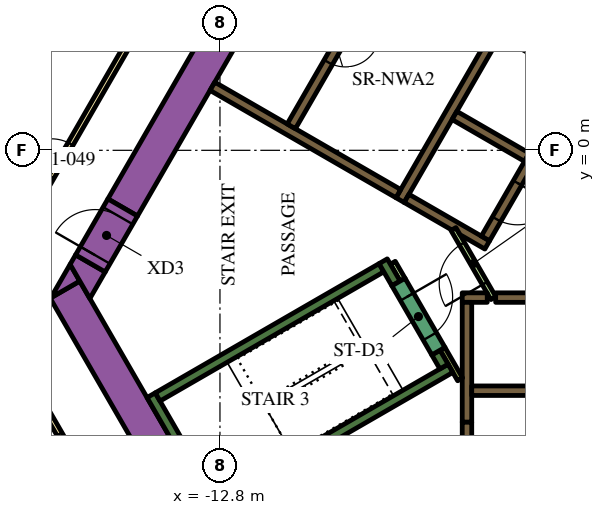
"""IFC4 building model, lengths in metres.
Left out: names, types, materials, properties, quantities, classifications, styles, units other than length and angle.
Written with IfcOpenShell. Run it as: python <this file> out.ifc"""

import sys

from ifc_helpers import new_model, si_unit, direction, frame, frame_2d, origin, place, context, subcontext, project, spatial, polyline, rectangle, outline, extrude, element, fill, save


model = new_model("IFC4")
c1 = context("Model", 3, precision=1e-05, world=origin(), true_north=direction((0.0, 1.0)))
c2 = subcontext(c1, "Body", "Model", "MODEL_VIEW")
j1 = project(units=[si_unit("LENGTHUNIT", "METRE"), si_unit("PLANEANGLEUNIT", "RADIAN")], contexts=[c1])
p1 = place(None, origin())
s1 = spatial("IfcSite", under=j1, at=p1, CompositionType="ELEMENT")
p2 = place(p1, origin())
s2 = spatial("IfcBuilding", under=s1, at=p2, CompositionType="ELEMENT")
p3 = place(p2, frame((0.0, 0.0, 35.4)))
s3 = spatial("IfcBuildingStorey", under=s2, at=p3, CompositionType="ELEMENT", Elevation=35.4)
p4 = place(p3, frame((-15.36, -1.503, 0.0), z_axis=(0.0, 0.0, 1.0), x_axis=(0.50000389221, 0.866023156604, 0.0)))
e1 = element("IfcWall", 1, at=p4, inside=s3, PredefinedType="SOLIDWALL", context=c2, shape_type="SweptSolid", body=[
    extrude(rectangle(XDim=21.0, YDim=0.9, at=frame_2d((10.5, 0.0))), origin(), (0.0, 0.0, 1.0), 3.9),
])
p5 = place(p3, frame((-12.134, -11.883, 0.0), z_axis=(0.0, 0.0, 1.0), x_axis=(-0.500005339912, 0.866022320763, 0.0)))
e2 = element("IfcWall", 2, at=p5, inside=s3, PredefinedType="SOLIDWALL", context=c2, shape_type="SweptSolid", body=[
    extrude(rectangle(XDim=9.488, YDim=0.9, at=frame_2d((4.744, 0.0))), origin(), (0.0, 0.0, 1.0), 3.9),
])
p6 = place(p3, origin())
e3 = element("IfcWall", 3, at=p6, inside=s3, PredefinedType="SOLIDWALL", context=c2, shape_type="SweptSolid", body=[
    extrude(outline(polyline([(-16.489, -3.44), (-17.251, -3.88), (-16.743, -3.0), (-16.489, -3.44)])), origin(), (0.0, 0.0, 1.0), 3.9),
])
e4 = element("IfcWall", 4, at=p6, inside=s3, PredefinedType="SOLIDWALL", context=c2, shape_type="SweptSolid", body=[
    extrude(outline(polyline([(-15.82, -3.201), (-16.223, -3.9), (-16.743, -3.0), (-16.599, -2.751), (-15.82, -3.201)])), origin(), (0.0, 0.0, 1.0), 3.9),
])
p7 = place(p3, frame((-12.885, -9.431, 0.0), z_axis=(0.0, 0.0, 1.0), x_axis=(-0.500020560727, 0.866013532718, 0.0)))
e5 = element("IfcWall", 5, at=p7, inside=s3, PredefinedType="SOLIDWALL", context=c2, shape_type="SweptSolid", body=[
    extrude(rectangle(XDim=3.45, YDim=0.25, at=frame_2d((1.725, 0.0))), origin(), (0.0, 0.0, 1.0), 3.9),
])
p8 = place(p3, frame((-14.44, -6.49, 0.0), z_axis=(0.0, 0.0, 1.0), x_axis=(0.866022966069, 0.500004222222, 0.0)))
e6 = element("IfcWall", 6, at=p8, inside=s3, PredefinedType="SOLIDWALL", context=c2, shape_type="SweptSolid", body=[
    extrude(rectangle(XDim=6.8, YDim=0.25, at=frame_2d((3.4, 0.0))), origin(), (0.0, 0.0, 1.0), 3.9),
])
p9 = place(p3, frame((-8.168, -3.503, 0.0), z_axis=(0.0, 0.0, 1.0), x_axis=(-0.499952099219, 0.866053057547, 0.0)))
e7 = element("IfcWall", 7, at=p9, inside=s3, PredefinedType="SOLIDWALL", context=c2, shape_type="SweptSolid", body=[
    extrude(rectangle(XDim=0.675, YDim=0.25, at=frame_2d((0.337, 0.0))), origin(), (0.0, 0.0, 1.0), 3.9),
])
p10 = place(p3, frame((-12.84, -9.261, 0.0), z_axis=(0.0, 0.0, 1.0), x_axis=(0.866016039709, 0.500016218704, 0.0)))
e8 = element("IfcWall", 8, at=p10, inside=s3, PredefinedType="SOLIDWALL", context=c2, shape_type="SweptSolid", body=[
    extrude(rectangle(XDim=7.05, YDim=0.25, at=frame_2d((3.525, 0.0))), origin(), (0.0, 0.0, 1.0), 3.9),
])
p11 = place(p3, frame((-6.905, -5.69, 0.0), z_axis=(0.0, 0.0, 1.0), x_axis=(-0.500402024738, 0.865793170242, 0.0)))
e9 = element("IfcWall", 9, at=p11, inside=s3, PredefinedType="SOLIDWALL", context=c2, shape_type="SweptSolid", body=[
    extrude(rectangle(XDim=0.425, YDim=0.25, at=frame_2d((0.212, 0.0))), origin(), (0.0, 0.0, 1.0), 3.9),
])
p12 = place(p3, frame((-5.545, -3.875, 0.0), z_axis=(0.0, 0.0, 1.0), x_axis=(1.0, 0.0, 0.0)))
e10 = element("IfcWall", 10, at=p12, inside=s3, PredefinedType="SOLIDWALL", context=c2, shape_type="SweptSolid", body=[
    extrude(rectangle(XDim=11.97, YDim=0.25, at=frame_2d((5.985, 0.0))), origin(), (0.0, 0.0, 1.0), 3.9),
])
p13 = place(p3, frame((-6.425, -3.875, 0.0), z_axis=(0.0, 0.0, 1.0), x_axis=(1.0, 0.0, 0.0)))
e11 = element("IfcWall", 11, at=p13, inside=s3, PredefinedType="SOLIDWALL", context=c2, shape_type="SweptSolid", body=[
    extrude(rectangle(XDim=0.658, YDim=0.25, at=frame_2d((0.329, 0.0))), origin(), (0.0, 0.0, 1.0), 3.9),
])
p14 = place(p3, frame((-6.3, -4.0, 0.0), z_axis=(0.0, 0.0, 1.0), x_axis=(0.0, -1.0, 0.0)))
e12 = element("IfcWall", 12, at=p14, inside=s3, PredefinedType="SOLIDWALL", context=c2, shape_type="SweptSolid", body=[
    extrude(rectangle(XDim=3.154, YDim=0.25, at=frame_2d((1.577, 0.0))), origin(), (0.0, 0.0, 1.0), 3.9),
])
p15 = place(p3, frame((-8.06, -1.311, 0.0), z_axis=(0.0, 0.0, 1.0), x_axis=(0.50000273126, 0.866023826885, 0.0)))
e13 = element("IfcWall", 13, at=p15, inside=s3, PredefinedType="SOLIDWALL", context=c2, shape_type="SweptSolid", body=[
    extrude(rectangle(XDim=10.33, YDim=0.25, at=frame_2d((5.165, 0.0))), origin(), (0.0, 0.0, 1.0), 3.9),
])
for number, where, z_axis, x_axis in (
    (14, (-5.369, 3.1, 0.0), (0.0, 0.0, 1.0), (0.866, -0.5, 0.0)),
    (15, (-4.724, -0.182, 0.0), (0.0, 0.0, 1.0), (-0.866, 0.5, 0.0)),
):
    element("IfcWall", number, at=place(p3, frame(where, z_axis=z_axis, x_axis=x_axis)), inside=s3, PredefinedType="SOLIDWALL", context=c2, shape_type="SweptSolid", body=[
        extrude(rectangle(XDim=2.2, YDim=0.25, at=frame_2d((1.1, 0.0))), origin(), (0.0, 0.0, 1.0), 3.9),
    ])
e16 = element("IfcWall", 16, at=p6, inside=s3, PredefinedType="SOLIDWALL", context=c2, shape_type="SweptSolid", body=[
    extrude(outline(polyline([(-5.922, -2.257), (-5.922, -2.257), (-5.705, -2.382), (-5.83, -2.598), (-6.483, -2.221), (-6.591, -2.033), (-6.591, -2.033), (-6.7, -2.096), (-7.952, -1.373), (-7.827, -1.156), (-5.922, -2.257)])), origin(), (0.0, 0.0, 1.0), 3.9),
])
p16 = place(p3, frame((-8.106, -1.14, 0.0), z_axis=(0.0, 0.0, 1.0), x_axis=(-0.866000643155, 0.500042884217, 0.0)))
e17 = element("IfcWall", 17, at=p16, inside=s3, PredefinedType="SOLIDWALL", context=c2, shape_type="SweptSolid", body=[
    extrude(rectangle(XDim=5.65, YDim=0.25, at=frame_2d((2.825, 0.0))), origin(), (0.0, 0.0, 1.0), 3.9),
])
p17 = place(p3, frame((-6.48, -6.027, 0.0), z_axis=(0.0, 0.0, 1.0), x_axis=(-0.499927229454, 0.866067413802, 0.0)))
e18 = element("IfcWall", 18, at=p17, inside=s3, PredefinedType="PARTITIONING", context=c2, shape_type="SweptSolid", body=[
    extrude(rectangle(XDim=0.929, YDim=0.15, at=frame_2d((0.464, 0.0))), origin(), (0.0, 0.0, 1.0), 3.9),
])
p18 = place(p3, frame((-8.252, -2.958, 0.0), z_axis=(0.0, 0.0, 1.0), x_axis=(0.500174715838, -0.865924508047, 0.0)))
e19 = element("IfcWall", 19, at=p18, inside=s3, PredefinedType="PARTITIONING", context=c2, shape_type="SweptSolid", body=[
    extrude(rectangle(XDim=0.514, YDim=0.15, at=frame_2d((0.257, 0.0))), origin(), (0.0, 0.0, 1.0), 2.75),
])
p19 = place(p3, frame((-6.175, -6.325, 0.0), z_axis=(0.0, 0.0, 1.0), x_axis=(1.0, 0.0, 0.0)))
e20 = element("IfcWall", 20, at=p19, inside=s3, PredefinedType="SOLIDWALL", context=c2, shape_type="SweptSolid", body=[
    extrude(rectangle(XDim=12.35, YDim=0.25, at=frame_2d((6.175, 0.0))), origin(), (0.0, 0.0, 1.0), 3.9),
])
p20 = place(p19, frame((3.205, 0.0, 0.0)))
e21 = element("IfcOpeningElement", 21, at=p20, cuts=e20, PredefinedType="OPENING", context=c2, shape_type="SweptSolid", body=[
    extrude(rectangle(XDim=0.9, YDim=2.1, at=frame_2d((0.45, 1.05))), frame((0.0, 0.135, 0.0), z_axis=(0.0, -1.0, 0.0), x_axis=(1.0, 0.0, 0.0)), (0.0, 0.0, 1.0), 0.27),
])
p21 = place(p19, frame((8.145, 0.0, 0.0)))
e22 = element("IfcOpeningElement", 22, at=p21, cuts=e20, PredefinedType="OPENING", context=c2, shape_type="SweptSolid", body=[
    extrude(rectangle(XDim=1.1, YDim=2.1, at=frame_2d((0.55, 1.05))), frame((0.0, 0.135, 0.0), z_axis=(0.0, -1.0, 0.0), x_axis=(1.0, 0.0, 0.0)), (0.0, 0.0, 1.0), 0.27),
])
p22 = place(p19, frame((10.665, 0.0, 0.0)))
e23 = element("IfcOpeningElement", 23, at=p22, cuts=e20, PredefinedType="OPENING", context=c2, shape_type="SweptSolid", body=[
    extrude(rectangle(XDim=1.1, YDim=2.1, at=frame_2d((0.55, 1.05))), frame((0.0, 0.135, 0.0), z_axis=(0.0, -1.0, 0.0), x_axis=(1.0, 0.0, 0.0)), (0.0, 0.0, 1.0), 0.27),
])
p23 = place(p3, frame((-6.008, 9.144, 0.0), z_axis=(0.0, 0.0, 1.0), x_axis=(-0.500006956611, -0.866021387346, 0.0)))
e24 = element("IfcWall", 24, at=p23, inside=s3, PredefinedType="SOLIDWALL", context=c2, shape_type="SweptSolid", body=[
    extrude(rectangle(XDim=9.83, YDim=0.25, at=frame_2d((4.915, 0.0))), origin(), (0.0, 0.0, 1.0), 3.9),
])
p24 = place(p23, frame((6.985, 0.0, 0.0)))
e25 = element("IfcOpeningElement", 25, at=p24, cuts=e24, PredefinedType="OPENING", context=c2, shape_type="SweptSolid", body=[
    extrude(rectangle(XDim=0.9, YDim=2.1, at=frame_2d((0.45, 1.05))), frame((0.0, 0.135, 0.0), z_axis=(0.0, -1.0, 0.0), x_axis=(1.0, 0.0, 0.0)), (0.0, 0.0, 1.0), 0.27),
])
p25 = place(p3, frame((-0.898, 6.194, 0.0), z_axis=(0.0, 0.0, 1.0), x_axis=(-0.499996202215, -0.866027596426, 0.0)))
e26 = element("IfcWall", 26, at=p25, inside=s3, PredefinedType="SOLIDWALL", context=c2, shape_type="SweptSolid", body=[
    extrude(rectangle(XDim=9.83, YDim=0.25, at=frame_2d((4.915, 0.0))), origin(), (0.0, 0.0, 1.0), 3.9),
])
p26 = place(p25, frame((0.585, 0.0, 0.0)))
e27 = element("IfcOpeningElement", 27, at=p26, cuts=e26, PredefinedType="OPENING", context=c2, shape_type="SweptSolid", body=[
    extrude(rectangle(XDim=1.1, YDim=2.1, at=frame_2d((0.55, 1.05))), frame((0.0, 0.135, 0.0), z_axis=(0.0, -1.0, 0.0), x_axis=(1.0, 0.0, 0.0)), (0.0, 0.0, 1.0), 0.27),
])
p27 = place(p25, frame((3.105, 0.0, 0.0)))
e28 = element("IfcOpeningElement", 28, at=p27, cuts=e26, PredefinedType="OPENING", context=c2, shape_type="SweptSolid", body=[
    extrude(rectangle(XDim=1.1, YDim=2.1, at=frame_2d((0.55, 1.05))), frame((0.0, 0.135, 0.0), z_axis=(0.0, -1.0, 0.0), x_axis=(1.0, 0.0, 0.0)), (0.0, 0.0, 1.0), 0.27),
])
p28 = place(p25, frame((5.625, 0.0, 0.0)))
e29 = element("IfcOpeningElement", 29, at=p28, cuts=e26, PredefinedType="OPENING", context=c2, shape_type="SweptSolid", body=[
    extrude(rectangle(XDim=1.1, YDim=2.1, at=frame_2d((0.55, 1.05))), frame((0.0, 0.135, 0.0), z_axis=(0.0, -1.0, 0.0), x_axis=(1.0, 0.0, 0.0)), (0.0, 0.0, 1.0), 0.27),
])
p29 = place(p25, frame((8.145, 0.0, 0.0)))
e30 = element("IfcOpeningElement", 30, at=p29, cuts=e26, PredefinedType="OPENING", context=c2, shape_type="SweptSolid", body=[
    extrude(rectangle(XDim=1.1, YDim=2.1, at=frame_2d((0.55, 1.05))), frame((0.0, 0.135, 0.0), z_axis=(0.0, -1.0, 0.0), x_axis=(1.0, 0.0, 0.0)), (0.0, 0.0, 1.0), 0.27),
])
p30 = place(p3, frame((-8.103, -3.466, 0.0), z_axis=(0.0, 0.0, 1.0), x_axis=(0.500078061341, -0.865980330357, 0.0)))
e31 = element("IfcWall", 31, at=p30, inside=s3, PredefinedType="SOLIDWALL", context=c2, shape_type="SweptSolid", body=[
    extrude(rectangle(XDim=2.1, YDim=0.4, at=frame_2d((1.05, 0.0))), origin(), (0.0, 0.0, 1.0), 3.9),
])
p31 = place(p30, frame((0.45, 0.0, 0.0)))
e32 = element("IfcOpeningElement", 32, at=p31, cuts=e31, PredefinedType="OPENING", context=c2, shape_type="SweptSolid", body=[
    extrude(rectangle(XDim=1.2, YDim=2.1, at=frame_2d((0.6, 1.05))), frame((0.0, 0.21, 0.0), z_axis=(0.0, -1.0, 0.0), x_axis=(1.0, 0.0, 0.0)), (0.0, 0.0, 1.0), 0.42),
])
p32 = place(p3, frame((-6.3, -7.154, 0.0), z_axis=(0.0, 0.0, 1.0), x_axis=(0.0, -1.0, 0.0)))
e33 = element("IfcWall", 33, at=p32, inside=s3, PredefinedType="SOLIDWALL", context=c2, shape_type="SweptSolid", body=[
    extrude(rectangle(XDim=1.8, YDim=0.25, at=frame_2d((0.9, 0.0))), origin(), (0.0, 0.0, 1.0), 3.9),
])
p33 = place(p32, frame((0.45, 0.0, 0.0)))
e34 = element("IfcOpeningElement", 34, at=p33, cuts=e33, PredefinedType="OPENING", context=c2, shape_type="SweptSolid", body=[
    extrude(rectangle(XDim=0.9, YDim=2.1, at=frame_2d((0.45, 1.05))), frame((0.0, 0.135, 0.0), z_axis=(0.0, -1.0, 0.0), x_axis=(1.0, 0.0, 0.0)), (0.0, 0.0, 1.0), 0.27),
])
p34 = place(p3, frame((-5.606, -3.89, 0.0), z_axis=(0.0, 0.0, 1.0), x_axis=(-0.500027713859, 0.866009402589, 0.0)))
e35 = element("IfcWall", 35, at=p34, inside=s3, PredefinedType="PARTITIONING", context=c2, shape_type="SweptSolid", body=[
    extrude(rectangle(XDim=2.1, YDim=0.15, at=frame_2d((1.05, 0.0))), origin(), (0.0, 0.0, 1.0), 2.75),
])
p35 = place(p34, frame((0.45, 0.0, 0.0)))
e36 = element("IfcOpeningElement", 36, at=p35, cuts=e35, PredefinedType="OPENING", context=c2, shape_type="SweptSolid", body=[
    extrude(rectangle(XDim=1.2, YDim=2.1, at=frame_2d((0.6, 1.05))), frame((0.0, 0.085, 0.0), z_axis=(0.0, -1.0, 0.0), x_axis=(1.0, 0.0, 0.0)), (0.0, 0.0, 1.0), 0.17),
])
p36 = place(p3, frame((-16.209, -2.976, 0.0), z_axis=(0.0, 0.0, 1.0), x_axis=(0.499954529098, 0.86605165483, 0.0)))
e37 = element("IfcWall", 37, at=p36, inside=s3, PredefinedType="SOLIDWALL", context=c2, shape_type="SweptSolid", body=[
    extrude(rectangle(XDim=1.7, YDim=0.9, at=frame_2d((0.85, 0.0))), origin(), (0.0, 0.0, 1.0), 3.9),
])
p37 = place(p36, frame((0.25, 0.0, 0.0)))
e38 = element("IfcOpeningElement", 38, at=p37, cuts=e37, PredefinedType="OPENING", context=c2, shape_type="SweptSolid", body=[
    extrude(rectangle(XDim=1.2, YDim=2.1, at=frame_2d((0.6, 1.05))), frame((0.0, 0.46, 0.0), z_axis=(0.0, -1.0, 0.0), x_axis=(1.0, 0.0, 0.0)), (0.0, 0.0, 1.0), 0.92),
])
p38 = place(p3, frame((-19.081, -3.9, 0.0), z_axis=(0.0, 0.0, 1.0), x_axis=(0.499998313975, 0.866026377209, 0.0)))
e39 = element("IfcWall", 39, at=p38, inside=s3, PredefinedType="PARTITIONING", context=c2, shape_type="SweptSolid", body=[
    extrude(rectangle(XDim=25.766, YDim=0.15, at=frame_2d((12.883, 0.0))), origin(), (0.0, 0.0, 1.0), 2.75),
])
p39 = place(p38, frame((24.586, 0.0, 0.0)))
e40 = element("IfcOpeningElement", 40, at=p39, cuts=e39, PredefinedType="OPENING", context=c2, shape_type="SweptSolid", body=[
    extrude(rectangle(XDim=1.0, YDim=2.1, at=frame_2d((0.5, 1.05))), frame((0.0, 0.085, 0.0), z_axis=(0.0, -1.0, 0.0), x_axis=(1.0, 0.0, 0.0)), (0.0, 0.0, 1.0), 0.17),
])
p40 = place(p38, frame((16.196, 0.0, 0.0)))
e41 = element("IfcOpeningElement", 41, at=p40, cuts=e39, PredefinedType="OPENING", context=c2, shape_type="SweptSolid", body=[
    extrude(rectangle(XDim=1.0, YDim=2.1, at=frame_2d((0.5, 1.05))), frame((0.0, 0.085, 0.0), z_axis=(0.0, -1.0, 0.0), x_axis=(1.0, 0.0, 0.0)), (0.0, 0.0, 1.0), 0.17),
])
p41 = place(p38, frame((14.789, 0.0, 0.0)))
e42 = element("IfcOpeningElement", 42, at=p41, cuts=e39, PredefinedType="OPENING", context=c2, shape_type="SweptSolid", body=[
    extrude(rectangle(XDim=1.1, YDim=2.1, at=frame_2d((0.55, 1.05))), frame((0.0, 0.085, 0.0), z_axis=(0.0, -1.0, 0.0), x_axis=(1.0, 0.0, 0.0)), (0.0, 0.0, 1.0), 0.17),
])
p42 = place(p38, frame((3.698, 0.0, 0.0)))
e43 = element("IfcOpeningElement", 43, at=p42, cuts=e39, PredefinedType="OPENING", context=c2, shape_type="SweptSolid", body=[
    extrude(rectangle(XDim=1.0, YDim=2.1, at=frame_2d((0.5, 1.05))), frame((0.0, 0.085, 0.0), z_axis=(0.0, -1.0, 0.0), x_axis=(1.0, 0.0, 0.0)), (0.0, 0.0, 1.0), 0.17),
])
p43 = place(p38, frame((1.531, 0.0, 0.0)))
e44 = element("IfcOpeningElement", 44, at=p43, cuts=e39, PredefinedType="OPENING", context=c2, shape_type="SweptSolid", body=[
    extrude(rectangle(XDim=0.9, YDim=2.1, at=frame_2d((0.45, 1.05))), frame((0.0, 0.085, 0.0), z_axis=(0.0, -1.0, 0.0), x_axis=(1.0, 0.0, 0.0)), (0.0, 0.0, 1.0), 0.17),
])
p44 = place(p3, frame((-16.412, -8.523, 0.0), z_axis=(0.0, 0.0, 1.0), x_axis=(-0.500001929737, 0.866024289647, 0.0)))
e45 = element("IfcWall", 45, at=p44, inside=s3, PredefinedType="PARTITIONING", context=c2, shape_type="SweptSolid", body=[
    extrude(rectangle(XDim=5.268, YDim=0.15, at=frame_2d((2.634, 0.0))), origin(), (0.0, 0.0, 1.0), 2.75),
])
p45 = place(p44, frame((0.226, 0.0, 0.0)))
e46 = element("IfcOpeningElement", 46, at=p45, cuts=e45, PredefinedType="OPENING", context=c2, shape_type="SweptSolid", body=[
    extrude(rectangle(XDim=1.0, YDim=2.1, at=frame_2d((0.5, 1.05))), frame((0.0, 0.085, 0.0), z_axis=(0.0, -1.0, 0.0), x_axis=(1.0, 0.0, 0.0)), (0.0, 0.0, 1.0), 0.17),
])
p46 = place(p24, origin())
e47 = element("IfcDoor", 47, at=p46, inside=s3, OperationType="SINGLE_SWING_LEFT", PredefinedType="DOOR", context=c2, shape_type="SweptSolid", body=[
    extrude(rectangle(XDim=0.9, YDim=2.1, at=frame_2d((0.45, 1.05))), frame((0.0, 0.025, 0.0), z_axis=(0.0, -1.0, 0.0), x_axis=(1.0, 0.0, 0.0)), (0.0, 0.0, 1.0), 0.05),
])
fill(e25, e47)
p47 = place(p29, origin())
e48 = element("IfcDoor", 48, at=p47, inside=s3, OperationType="DOUBLE_DOOR_SLIDING", PredefinedType="DOOR", context=c2, shape_type="SweptSolid", body=[
    extrude(rectangle(XDim=1.1, YDim=2.1, at=frame_2d((0.55, 1.05))), frame((0.0, 0.025, 0.0), z_axis=(0.0, -1.0, 0.0), x_axis=(1.0, 0.0, 0.0)), (0.0, 0.0, 1.0), 0.05),
])
fill(e30, e48)
p48 = place(p31, origin())
e49 = element("IfcDoor", 49, at=p48, inside=s3, OperationType="SINGLE_SWING_LEFT", PredefinedType="DOOR", context=c2, shape_type="SweptSolid", body=[
    extrude(rectangle(XDim=1.2, YDim=2.1, at=frame_2d((0.6, 1.05))), frame((0.0, 0.025, 0.0), z_axis=(0.0, -1.0, 0.0), x_axis=(1.0, 0.0, 0.0)), (0.0, 0.0, 1.0), 0.05),
])
fill(e32, e49)
p49 = place(p35, origin())
e50 = element("IfcDoor", 50, at=p49, inside=s3, OperationType="SINGLE_SWING_LEFT", PredefinedType="DOOR", context=c2, shape_type="SweptSolid", body=[
    extrude(rectangle(XDim=1.2, YDim=2.1, at=frame_2d((0.6, 1.05))), frame((0.0, 0.025, 0.0), z_axis=(0.0, -1.0, 0.0), x_axis=(1.0, 0.0, 0.0)), (0.0, 0.0, 1.0), 0.05),
])
fill(e36, e50)
p50 = place(p37, origin())
e51 = element("IfcDoor", 51, at=p50, inside=s3, OperationType="SINGLE_SWING_LEFT", PredefinedType="DOOR", context=c2, shape_type="SweptSolid", body=[
    extrude(rectangle(XDim=1.2, YDim=2.1, at=frame_2d((0.6, 1.05))), frame((0.0, 0.025, 0.0), z_axis=(0.0, -1.0, 0.0), x_axis=(1.0, 0.0, 0.0)), (0.0, 0.0, 1.0), 0.05),
])
fill(e38, e51)
p51 = place(p42, origin())
e52 = element("IfcDoor", 52, at=p51, inside=s3, OperationType="SINGLE_SWING_LEFT", PredefinedType="DOOR", context=c2, shape_type="SweptSolid", body=[
    extrude(rectangle(XDim=1.0, YDim=2.1, at=frame_2d((0.5, 1.05))), frame((0.0, 0.025, 0.0), z_axis=(0.0, -1.0, 0.0), x_axis=(1.0, 0.0, 0.0)), (0.0, 0.0, 1.0), 0.05),
])
fill(e43, e52)
p52 = place(p45, origin())
e53 = element("IfcDoor", 53, at=p52, inside=s3, OperationType="SINGLE_SWING_LEFT", PredefinedType="DOOR", context=c2, shape_type="SweptSolid", body=[
    extrude(rectangle(XDim=1.0, YDim=2.1, at=frame_2d((0.5, 1.05))), frame((0.0, 0.025, 0.0), z_axis=(0.0, -1.0, 0.0), x_axis=(1.0, 0.0, 0.0)), (0.0, 0.0, 1.0), 0.05),
])
fill(e46, e53)
save(model, sys.argv[1])
